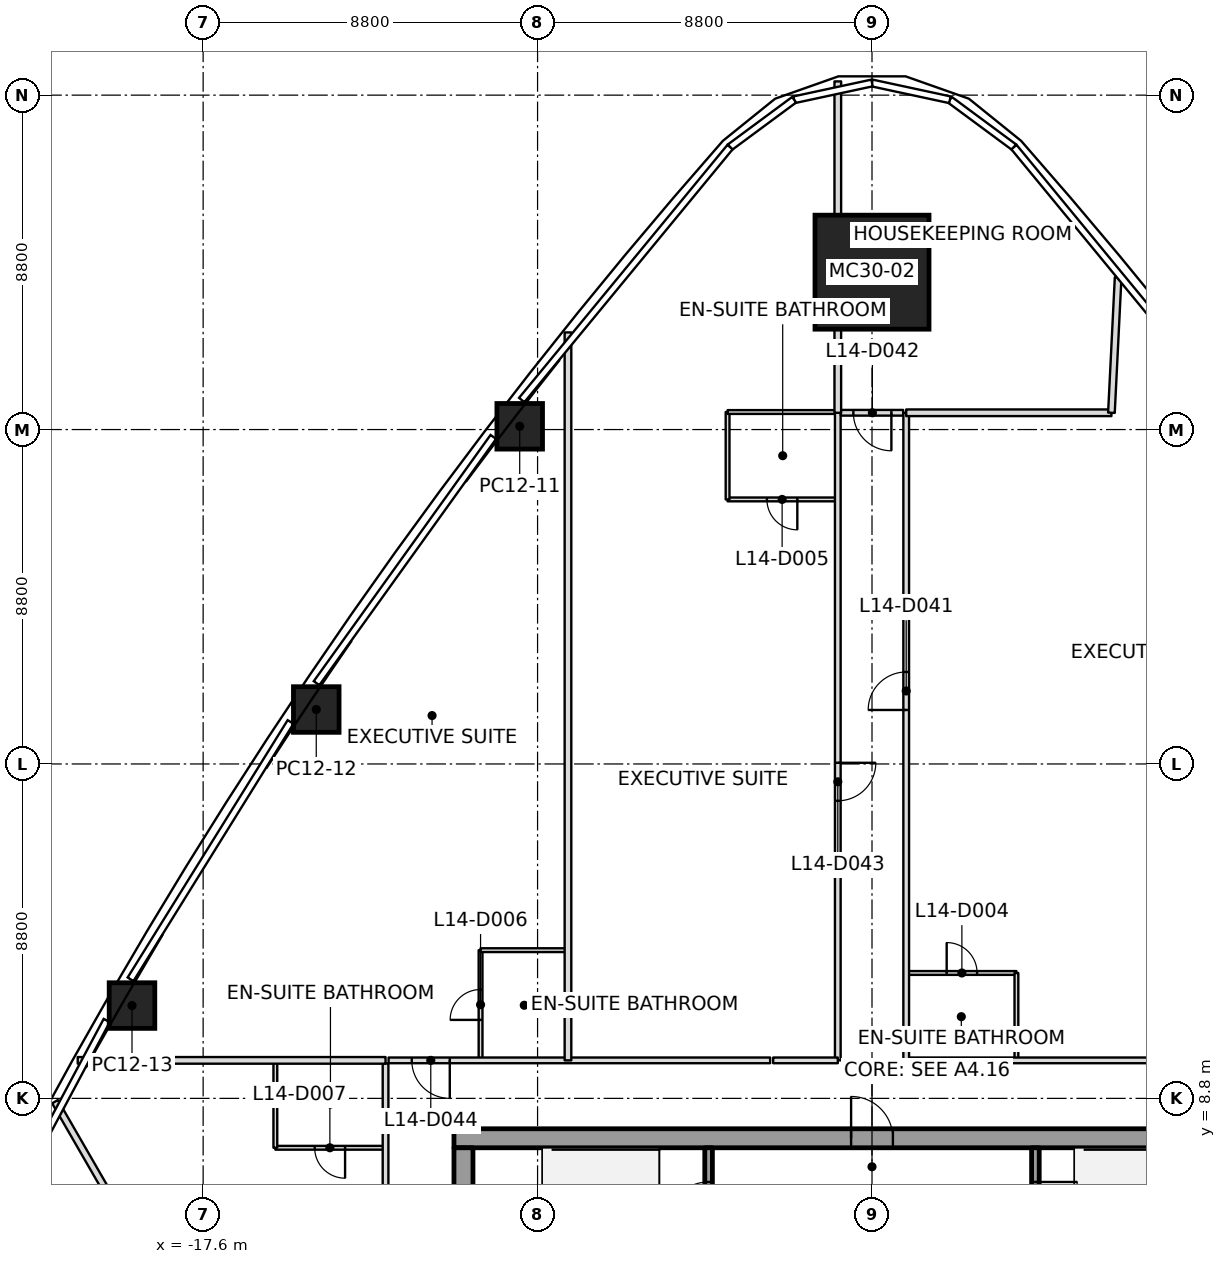
"""IFC4 building model, lengths in metres.
Left out: names, types, materials, properties, quantities, classifications, styles, units other than length and angle.
Written with IfcOpenShell. Run it as: python <this file> out.ifc"""

import sys

from ifc_helpers import new_model, si_unit, direction, frame, frame_2d, origin, origin_2d, place, context, subcontext, project, spatial, rectangle, extrude, element, fill, save


model = new_model("IFC4")
c1 = context("Model", 3, precision=1e-05, world=origin(), true_north=direction((0.0, 1.0)))
c2 = subcontext(c1, "Body", "Model", "MODEL_VIEW")
j1 = project(units=[si_unit("LENGTHUNIT", "METRE"), si_unit("PLANEANGLEUNIT", "RADIAN")], contexts=[c1])
p1 = place(None, origin())
s1 = spatial("IfcSite", under=j1, at=p1, CompositionType="ELEMENT")
p2 = place(p1, origin())
s2 = spatial("IfcBuilding", under=s1, at=p2, CompositionType="ELEMENT")
p3 = place(p2, frame((0.0, 0.0, 73.9)))
s3 = spatial("IfcBuildingStorey", under=s2, at=p3, CompositionType="ELEMENT", Elevation=73.9)
p4 = place(p3, frame((0.0, 30.542, 0.0), z_axis=(0.0, -0.035277579215, 0.999377552482), x_axis=(1.0, 0.0, 0.0)))
e1 = element("IfcColumn", 1, at=p4, inside=s3, PredefinedType="COLUMN", context=c2, shape_type="SweptSolid", body=[
    extrude(rectangle(XDim=3.0, YDim=3.0, at=origin_2d()), origin(), (0.0, 0.0, 1.0), 3.702),
])
p5 = place(p3, frame((-9.27, 26.486, 0.0), z_axis=(0.000197891909, -0.02236178572, 0.99974992442), x_axis=(0.609946008584, 0.792247508558, 0.017599766916)))
e2 = element("IfcColumn", 2, at=p5, inside=s3, PredefinedType="COLUMN", context=c2, shape_type="SweptSolid", body=[
    extrude(rectangle(XDim=1.2, YDim=1.2, at=origin_2d()), origin(), (0.0, 0.0, 1.0), 3.701),
])
p6 = place(p3, frame((-14.623, 19.033, 0.0), z_axis=(0.005673642186, -0.014382023216, 0.999880476453), x_axis=(0.556182234491, 0.831013798021, 0.008797132212)))
e3 = element("IfcColumn", 3, at=p6, inside=s3, PredefinedType="COLUMN", context=c2, shape_type="SweptSolid", body=[
    extrude(rectangle(XDim=1.2, YDim=1.2, at=origin_2d()), origin(), (0.0, 0.0, 1.0), 3.701),
])
p7 = place(p3, frame((-19.472, 11.242, 0.0), z_axis=(0.010688020009, -0.006201690622, 0.999923649716), x_axis=(0.499971440741, 0.866041891424, 2.7221193e-05)))
e4 = element("IfcColumn", 4, at=p7, inside=s3, PredefinedType="COLUMN", context=c2, shape_type="SweptSolid", body=[
    extrude(rectangle(XDim=1.2, YDim=1.2, at=origin_2d()), origin(), (0.0, 0.0, 1.0), 3.7),
])
p8 = place(p3, frame((-11.0, 7.75, 0.0), z_axis=(0.0, 0.0, 1.0), x_axis=(1.0, 0.0, 0.0)))
e5 = element("IfcWall", 5, at=p8, inside=s3, PredefinedType="SHEAR", context=c2, shape_type="SweptSolid", body=[
    extrude(rectangle(XDim=22.0, YDim=0.5, at=frame_2d((11.0, 0.0))), origin(), (0.0, 0.0, 1.0), 3.7),
])
p9 = place(p8, frame((10.45, 0.0, 0.0)))
e6 = element("IfcOpeningElement", 6, at=p9, cuts=e5, PredefinedType="OPENING", context=c2, shape_type="SweptSolid", body=[
    extrude(rectangle(XDim=1.1, YDim=2.1, at=frame_2d((0.55, 1.05))), frame((0.0, 0.25, 0.0), z_axis=(0.0, -1.0, 0.0), x_axis=(1.0, 0.0, 0.0)), (0.0, 0.0, 1.0), 0.5),
])
p10 = place(p3, frame((-10.75, -7.5, 0.0), z_axis=(0.0, 0.0, 1.0), x_axis=(0.0, 1.0, 0.0)))
e7 = element("IfcWall", 7, at=p10, inside=s3, PredefinedType="SHEAR", context=c2, shape_type="SweptSolid", body=[
    extrude(rectangle(XDim=15.0, YDim=0.5, at=frame_2d((7.5, 0.0))), origin(), (0.0, 0.0, 1.0), 3.7),
])
p11 = place(p10, frame((6.6, 0.0, 0.0)))
e8 = element("IfcOpeningElement", 8, at=p11, cuts=e7, PredefinedType="OPENING", context=c2, shape_type="SweptSolid", body=[
    extrude(rectangle(XDim=1.8, YDim=2.1, at=frame_2d((0.9, 1.05))), frame((0.0, 0.25, 0.0), z_axis=(0.0, -1.0, 0.0), x_axis=(1.0, 0.0, 0.0)), (0.0, 0.0, 1.0), 0.5),
])
p12 = place(p3, frame((-4.3, 4.6, 0.0), z_axis=(0.0, 0.0, 1.0), x_axis=(0.0, 1.0, 0.0)))
e9 = element("IfcWall", 9, at=p12, inside=s3, PredefinedType="SOLIDWALL", context=c2, shape_type="SweptSolid", body=[
    extrude(rectangle(XDim=2.9, YDim=0.2, at=frame_2d((1.45, 0.0))), origin(), (0.0, 0.0, 1.0), 3.55),
])
p13 = place(p12, frame((0.9, 0.0, 0.0)))
e10 = element("IfcOpeningElement", 10, at=p13, cuts=e9, PredefinedType="OPENING", context=c2, shape_type="SweptSolid", body=[
    extrude(rectangle(XDim=1.1, YDim=2.1, at=frame_2d((0.55, 1.05))), frame((0.0, 0.1, 0.0), z_axis=(0.0, -1.0, 0.0), x_axis=(1.0, 0.0, 0.0)), (0.0, 0.0, 1.0), 0.2),
])
p14 = place(p3, frame((4.3, 7.5, 0.0), z_axis=(0.0, 0.0, 1.0), x_axis=(0.0, -1.0, 0.0)))
e11 = element("IfcWall", 11, at=p14, inside=s3, PredefinedType="SOLIDWALL", context=c2, shape_type="SweptSolid", body=[
    extrude(rectangle(XDim=2.9, YDim=0.2, at=frame_2d((1.45, 0.0))), origin(), (0.0, 0.0, 1.0), 3.55),
])
p15 = place(p14, frame((0.9, 0.0, 0.0)))
e12 = element("IfcOpeningElement", 12, at=p15, cuts=e11, PredefinedType="OPENING", context=c2, shape_type="SweptSolid", body=[
    extrude(rectangle(XDim=1.1, YDim=2.1, at=frame_2d((0.55, 1.05))), frame((0.0, 0.1, 0.0), z_axis=(0.0, -1.0, 0.0), x_axis=(1.0, 0.0, 0.0)), (0.0, 0.0, 1.0), 0.2),
])
p16 = place(p3, frame((-18.689, 3.849, 0.0), z_axis=(0.0, 0.0, 1.0), x_axis=(-0.49999586752, 0.86602778966, 0.0)))
e13 = element("IfcWall", 13, at=p16, inside=s3, PredefinedType="PARTITIONING", context=c2, shape_type="SweptSolid", body=[
    extrude(rectangle(XDim=5.617, YDim=0.175, at=frame_2d((2.808, 0.0))), origin(), (0.0, 0.0, 1.0), 2.934),
])
p17 = place(p3, frame((-12.8, 9.8, 0.0), z_axis=(0.0, 0.0, 1.0), x_axis=(-1.0, 0.0, 0.0)))
e14 = element("IfcWall", 14, at=p17, inside=s3, PredefinedType="PARTITIONING", context=c2, shape_type="SweptSolid", body=[
    extrude(rectangle(XDim=8.1, YDim=0.175, at=frame_2d((4.05, 0.0))), origin(), (0.0, 0.0, 1.0), 2.934),
])
p18 = place(p3, frame((-8.0, 9.8, 0.0), z_axis=(0.0, 0.0, 1.0), x_axis=(0.0, 1.0, 0.0)))
e15 = element("IfcWall", 15, at=p18, inside=s3, PredefinedType="PARTITIONING", context=c2, shape_type="SweptSolid", body=[
    extrude(rectangle(XDim=19.156, YDim=0.175, at=frame_2d((9.578, 0.0))), origin(), (0.0, 0.0, 1.0), 2.934),
])
p19 = place(p3, frame((-0.9, 35.562, 0.0), z_axis=(0.0, 0.0, 1.0), x_axis=(0.0, -1.0, 0.0)))
e16 = element("IfcWall", 16, at=p19, inside=s3, PredefinedType="PARTITIONING", context=c2, shape_type="SweptSolid", body=[
    extrude(rectangle(XDim=8.72, YDim=0.175, at=frame_2d((4.36, 0.0))), origin(), (0.0, 0.0, 1.0), 2.934),
])
p20 = place(p3, frame((0.9, 26.842, 0.0), z_axis=(0.0, 0.0, 1.0), x_axis=(1.0, 0.0, 0.0)))
e17 = element("IfcWall", 17, at=p20, inside=s3, PredefinedType="PARTITIONING", context=c2, shape_type="SweptSolid", body=[
    extrude(rectangle(XDim=5.4, YDim=0.175, at=frame_2d((2.7, 0.0))), origin(), (0.0, 0.0, 1.0), 3.15),
])
p21 = place(p3, frame((6.3, 26.842, 0.0), z_axis=(0.0, 0.0, 1.0), x_axis=(0.049548494215, 0.998771719023, 0.0)))
e18 = element("IfcWall", 18, at=p21, inside=s3, PredefinedType="PARTITIONING", context=c2, shape_type="SweptSolid", body=[
    extrude(rectangle(XDim=3.567, YDim=0.175, at=frame_2d((1.784, 0.0))), origin(), (0.0, 0.0, 1.0), 2.934),
])
p22 = place(p3, frame((-12.8, 9.72, 0.0), z_axis=(0.0, 0.0, 1.0), x_axis=(0.0, -1.0, 0.0)))
e19 = element("IfcWall", 19, at=p22, inside=s3, PredefinedType="PARTITIONING", context=c2, shape_type="SweptSolid", body=[
    extrude(rectangle(XDim=16.071, YDim=0.15, at=frame_2d((8.035, 0.0))), origin(), (0.0, 0.0, 1.0), 2.947),
])
p23 = place(p22, frame((3.595, 0.0, 0.0)))
e20 = element("IfcOpeningElement", 20, at=p23, cuts=e19, PredefinedType="OPENING", context=c2, shape_type="SweptSolid", body=[
    extrude(rectangle(XDim=1.0, YDim=2.1, at=frame_2d((0.5, 1.05))), frame((0.0, 0.075, 0.0), z_axis=(0.0, -1.0, 0.0), x_axis=(1.0, 0.0, 0.0)), (0.0, 0.0, 1.0), 0.15),
])
p24 = place(p3, frame((-2.68, 9.8, 0.0), z_axis=(0.0, 0.0, 1.0), x_axis=(-1.0, 0.0, 0.0)))
e21 = element("IfcWall", 21, at=p24, inside=s3, PredefinedType="PARTITIONING", context=c2, shape_type="SweptSolid", body=[
    extrude(rectangle(XDim=10.04, YDim=0.15, at=frame_2d((5.02, 0.0))), origin(), (0.0, 0.0, 1.0), 2.947),
])
p25 = place(p24, frame((8.43, 0.0, 0.0)))
e22 = element("IfcOpeningElement", 22, at=p25, cuts=e21, PredefinedType="OPENING", context=c2, shape_type="SweptSolid", body=[
    extrude(rectangle(XDim=1.0, YDim=2.1, at=frame_2d((0.5, 1.05))), frame((0.0, 0.075, 0.0), z_axis=(0.0, -1.0, 0.0), x_axis=(1.0, 0.0, 0.0)), (0.0, 0.0, 1.0), 0.15),
])
p26 = place(p3, frame((-0.9, 26.842, 0.0), z_axis=(0.0, 0.0, 1.0), x_axis=(0.0, -1.0, 0.0)))
e23 = element("IfcWall", 23, at=p26, inside=s3, PredefinedType="PARTITIONING", context=c2, shape_type="SweptSolid", body=[
    extrude(rectangle(XDim=17.042, YDim=0.15, at=frame_2d((8.521, 0.0))), origin(), (0.0, 0.0, 1.0), 2.947),
])
p27 = place(p26, frame((9.211, 0.0, 0.0)))
e24 = element("IfcOpeningElement", 24, at=p27, cuts=e23, PredefinedType="OPENING", context=c2, shape_type="SweptSolid", body=[
    extrude(rectangle(XDim=1.0, YDim=2.1, at=frame_2d((0.5, 1.05))), frame((0.0, 0.075, 0.0), z_axis=(0.0, -1.0, 0.0), x_axis=(1.0, 0.0, 0.0)), (0.0, 0.0, 1.0), 0.15),
])
p28 = place(p3, frame((-0.9, 9.8, 0.0), z_axis=(0.0, 0.0, 1.0), x_axis=(-1.0, 0.0, 0.0)))
e25 = element("IfcWall", 25, at=p28, inside=s3, PredefinedType="PARTITIONING", context=c2, shape_type="SweptSolid", body=[
    extrude(rectangle(XDim=1.7, YDim=0.15, at=frame_2d((0.85, 0.0))), origin(), (0.0, 0.0, 1.0), 3.15),
])
p29 = place(p3, frame((0.82, 26.842, 0.0), z_axis=(0.0, 0.0, 1.0), x_axis=(-1.0, 0.0, 0.0)))
e26 = element("IfcWall", 26, at=p29, inside=s3, PredefinedType="PARTITIONING", context=c2, shape_type="SweptSolid", body=[
    extrude(rectangle(XDim=1.64, YDim=0.15, at=frame_2d((0.82, 0.0))), origin(), (0.0, 0.0, 1.0), 2.797),
])
p30 = place(p29, frame((0.31, 0.0, 0.0)))
e27 = element("IfcOpeningElement", 27, at=p30, cuts=e26, PredefinedType="OPENING", context=c2, shape_type="SweptSolid", body=[
    extrude(rectangle(XDim=1.0, YDim=2.1, at=frame_2d((0.5, 1.05))), frame((0.0, 0.075, 0.0), z_axis=(0.0, -1.0, 0.0), x_axis=(1.0, 0.0, 0.0)), (0.0, 0.0, 1.0), 0.15),
])
p31 = place(p3, frame((11.02, 9.8, 0.0), z_axis=(0.0, 0.0, 1.0), x_axis=(-1.0, 0.0, 0.0)))
e28 = element("IfcWall", 28, at=p31, inside=s3, PredefinedType="PARTITIONING", context=c2, shape_type="SweptSolid", body=[
    extrude(rectangle(XDim=10.12, YDim=0.15, at=frame_2d((5.06, 0.0))), origin(), (0.0, 0.0, 1.0), 2.947),
])
p32 = place(p3, frame((0.9, 9.8, 0.0), z_axis=(0.0, 0.0, 1.0), x_axis=(0.0, 1.0, 0.0)))
e29 = element("IfcWall", 29, at=p32, inside=s3, PredefinedType="PARTITIONING", context=c2, shape_type="SweptSolid", body=[
    extrude(rectangle(XDim=17.042, YDim=0.15, at=frame_2d((8.521, 0.0))), origin(), (0.0, 0.0, 1.0), 2.947),
])
p33 = place(p32, frame((9.221, 0.0, 0.0)))
e30 = element("IfcOpeningElement", 30, at=p33, cuts=e29, PredefinedType="OPENING", context=c2, shape_type="SweptSolid", body=[
    extrude(rectangle(XDim=1.0, YDim=2.1, at=frame_2d((0.5, 1.05))), frame((0.0, 0.075, 0.0), z_axis=(0.0, -1.0, 0.0), x_axis=(1.0, 0.0, 0.0)), (0.0, 0.0, 1.0), 0.15),
])
p34 = place(p3, frame((-12.83, 7.5, 0.0), z_axis=(0.0, 0.0, 1.0), x_axis=(-1.0, 0.0, 0.0)))
e31 = element("IfcWall", 31, at=p34, inside=s3, PredefinedType="PARTITIONING", context=c2, shape_type="SweptSolid", body=[
    extrude(rectangle(XDim=2.87, YDim=0.1, at=frame_2d((1.435, 0.0))), origin(), (0.0, 0.0, 1.0), 3.15),
])
p35 = place(p34, frame((1.035, 0.0, 0.0)))
e32 = element("IfcOpeningElement", 32, at=p35, cuts=e31, PredefinedType="OPENING", context=c2, shape_type="SweptSolid", body=[
    extrude(rectangle(XDim=0.8, YDim=2.1, at=frame_2d((0.4, 1.05))), frame((0.0, 0.05, 0.0), z_axis=(0.0, -1.0, 0.0), x_axis=(1.0, 0.0, 0.0)), (0.0, 0.0, 1.0), 0.1),
])
p36 = place(p3, frame((-15.7, 7.5, 0.0), z_axis=(0.0, 0.0, 1.0), x_axis=(0.0, 1.0, 0.0)))
e33 = element("IfcWall", 33, at=p36, inside=s3, PredefinedType="PARTITIONING", context=c2, shape_type="SweptSolid", body=[
    extrude(rectangle(XDim=2.27, YDim=0.1, at=frame_2d((1.135, 0.0))), origin(), (0.0, 0.0, 1.0), 3.15),
])
p37 = place(p3, frame((-10.3, 9.83, 0.0), z_axis=(0.0, 0.0, 1.0), x_axis=(0.0, 1.0, 0.0)))
e34 = element("IfcWall", 34, at=p37, inside=s3, PredefinedType="PARTITIONING", context=c2, shape_type="SweptSolid", body=[
    extrude(rectangle(XDim=2.87, YDim=0.1, at=frame_2d((1.435, 0.0))), origin(), (0.0, 0.0, 1.0), 2.947),
])
p38 = place(p37, frame((1.035, 0.0, 0.0)))
e35 = element("IfcOpeningElement", 35, at=p38, cuts=e34, PredefinedType="OPENING", context=c2, shape_type="SweptSolid", body=[
    extrude(rectangle(XDim=0.8, YDim=2.1, at=frame_2d((0.4, 1.05))), frame((0.0, 0.05, 0.0), z_axis=(0.0, -1.0, 0.0), x_axis=(1.0, 0.0, 0.0)), (0.0, 0.0, 1.0), 0.1),
])
p39 = place(p3, frame((-10.3, 12.7, 0.0), z_axis=(0.0, 0.0, 1.0), x_axis=(1.0, 0.0, 0.0)))
e36 = element("IfcWall", 36, at=p39, inside=s3, PredefinedType="PARTITIONING", context=c2, shape_type="SweptSolid", body=[
    extrude(rectangle(XDim=2.27, YDim=0.1, at=frame_2d((1.135, 0.0))), origin(), (0.0, 0.0, 1.0), 3.15),
])
p40 = place(p3, frame((-0.93, 24.562, 0.0), z_axis=(0.0, 0.0, 1.0), x_axis=(-1.0, 0.0, 0.0)))
e37 = element("IfcWall", 37, at=p40, inside=s3, PredefinedType="PARTITIONING", context=c2, shape_type="SweptSolid", body=[
    extrude(rectangle(XDim=2.87, YDim=0.1, at=frame_2d((1.435, 0.0))), origin(), (0.0, 0.0, 1.0), 3.15),
])
p41 = place(p40, frame((1.035, 0.0, 0.0)))
e38 = element("IfcOpeningElement", 38, at=p41, cuts=e37, PredefinedType="OPENING", context=c2, shape_type="SweptSolid", body=[
    extrude(rectangle(XDim=0.8, YDim=2.1, at=frame_2d((0.4, 1.05))), frame((0.0, 0.05, 0.0), z_axis=(0.0, -1.0, 0.0), x_axis=(1.0, 0.0, 0.0)), (0.0, 0.0, 1.0), 0.1),
])
p42 = place(p3, frame((-3.8, 24.562, 0.0), z_axis=(0.0, 0.0, 1.0), x_axis=(0.0, 1.0, 0.0)))
e39 = element("IfcWall", 39, at=p42, inside=s3, PredefinedType="PARTITIONING", context=c2, shape_type="SweptSolid", body=[
    extrude(rectangle(XDim=2.3, YDim=0.1, at=frame_2d((1.15, 0.0))), origin(), (0.0, 0.0, 1.0), 3.15),
])
p43 = place(p3, frame((-3.8, 26.862, 0.0), z_axis=(0.0, 0.0, 1.0), x_axis=(1.0, 0.0, 0.0)))
e40 = element("IfcWall", 40, at=p43, inside=s3, PredefinedType="PARTITIONING", context=c2, shape_type="SweptSolid", body=[
    extrude(rectangle(XDim=2.87, YDim=0.1, at=frame_2d((1.435, 0.0))), origin(), (0.0, 0.0, 1.0), 3.15),
])
p44 = place(p3, frame((0.93, 12.1, 0.0), z_axis=(0.0, 0.0, 1.0), x_axis=(1.0, 0.0, 0.0)))
e41 = element("IfcWall", 41, at=p44, inside=s3, PredefinedType="PARTITIONING", context=c2, shape_type="SweptSolid", body=[
    extrude(rectangle(XDim=2.87, YDim=0.1, at=frame_2d((1.435, 0.0))), origin(), (0.0, 0.0, 1.0), 3.15),
])
p45 = place(p44, frame((1.035, 0.0, 0.0)))
e42 = element("IfcOpeningElement", 42, at=p45, cuts=e41, PredefinedType="OPENING", context=c2, shape_type="SweptSolid", body=[
    extrude(rectangle(XDim=0.8, YDim=2.1, at=frame_2d((0.4, 1.05))), frame((0.0, 0.05, 0.0), z_axis=(0.0, -1.0, 0.0), x_axis=(1.0, 0.0, 0.0)), (0.0, 0.0, 1.0), 0.1),
])
p46 = place(p3, frame((3.8, 12.1, 0.0), z_axis=(0.0, 0.0, 1.0), x_axis=(0.0, -1.0, 0.0)))
e43 = element("IfcWall", 43, at=p46, inside=s3, PredefinedType="PARTITIONING", context=c2, shape_type="SweptSolid", body=[
    extrude(rectangle(XDim=2.27, YDim=0.1, at=frame_2d((1.135, 0.0))), origin(), (0.0, 0.0, 1.0), 3.15),
])
p47 = place(p33, origin())
e44 = element("IfcDoor", 44, at=p47, inside=s3, OperationType="SINGLE_SWING_LEFT", PredefinedType="DOOR", context=c2, shape_type="SweptSolid", body=[
    extrude(rectangle(XDim=1.0, YDim=2.1, at=frame_2d((0.5, 1.05))), frame((0.0, 0.025, 0.0), z_axis=(0.0, -1.0, 0.0), x_axis=(1.0, 0.0, 0.0)), (0.0, 0.0, 1.0), 0.05),
])
fill(e30, e44)
p48 = place(p45, origin())
e45 = element("IfcDoor", 45, at=p48, inside=s3, OperationType="SINGLE_SWING_LEFT", PredefinedType="DOOR", context=c2, shape_type="SweptSolid", body=[
    extrude(rectangle(XDim=0.8, YDim=2.1, at=frame_2d((0.4, 1.05))), frame((0.0, 0.025, 0.0), z_axis=(0.0, -1.0, 0.0), x_axis=(1.0, 0.0, 0.0)), (0.0, 0.0, 1.0), 0.05),
])
fill(e42, e45)
p49 = place(p30, origin())
e46 = element("IfcDoor", 46, at=p49, inside=s3, OperationType="SINGLE_SWING_LEFT", PredefinedType="DOOR", context=c2, shape_type="SweptSolid", body=[
    extrude(rectangle(XDim=1.0, YDim=2.1, at=frame_2d((0.5, 1.05))), frame((0.0, 0.025, 0.0), z_axis=(0.0, -1.0, 0.0), x_axis=(1.0, 0.0, 0.0)), (0.0, 0.0, 1.0), 0.05),
])
fill(e27, e46)
p50 = place(p27, origin())
e47 = element("IfcDoor", 47, at=p50, inside=s3, OperationType="SINGLE_SWING_RIGHT", PredefinedType="DOOR", context=c2, shape_type="SweptSolid", body=[
    extrude(rectangle(XDim=1.0, YDim=2.1, at=frame_2d((0.5, 1.05))), frame((0.0, 0.025, 0.0), z_axis=(0.0, -1.0, 0.0), x_axis=(1.0, 0.0, 0.0)), (0.0, 0.0, 1.0), 0.05),
])
fill(e24, e47)
p51 = place(p41, origin())
e48 = element("IfcDoor", 48, at=p51, inside=s3, OperationType="SINGLE_SWING_LEFT", PredefinedType="DOOR", context=c2, shape_type="SweptSolid", body=[
    extrude(rectangle(XDim=0.8, YDim=2.1, at=frame_2d((0.4, 1.05))), frame((0.0, 0.025, 0.0), z_axis=(0.0, -1.0, 0.0), x_axis=(1.0, 0.0, 0.0)), (0.0, 0.0, 1.0), 0.05),
])
fill(e38, e48)
p52 = place(p25, origin())
e49 = element("IfcDoor", 49, at=p52, inside=s3, OperationType="SINGLE_SWING_LEFT", PredefinedType="DOOR", context=c2, shape_type="SweptSolid", body=[
    extrude(rectangle(XDim=1.0, YDim=2.1, at=frame_2d((0.5, 1.05))), frame((0.0, 0.025, 0.0), z_axis=(0.0, -1.0, 0.0), x_axis=(1.0, 0.0, 0.0)), (0.0, 0.0, 1.0), 0.05),
])
fill(e22, e49)
p53 = place(p38, origin())
e50 = element("IfcDoor", 50, at=p53, inside=s3, OperationType="SINGLE_SWING_LEFT", PredefinedType="DOOR", context=c2, shape_type="SweptSolid", body=[
    extrude(rectangle(XDim=0.8, YDim=2.1, at=frame_2d((0.4, 1.05))), frame((0.0, 0.025, 0.0), z_axis=(0.0, -1.0, 0.0), x_axis=(1.0, 0.0, 0.0)), (0.0, 0.0, 1.0), 0.05),
])
fill(e35, e50)
p54 = place(p35, origin())
e51 = element("IfcDoor", 51, at=p54, inside=s3, OperationType="SINGLE_SWING_RIGHT", PredefinedType="DOOR", context=c2, shape_type="SweptSolid", body=[
    extrude(rectangle(XDim=0.8, YDim=2.1, at=frame_2d((0.4, 1.05))), frame((0.0, 0.025, 0.0), z_axis=(0.0, -1.0, 0.0), x_axis=(1.0, 0.0, 0.0)), (0.0, 0.0, 1.0), 0.05),
])
fill(e32, e51)
p55 = place(p13, origin())
e52 = element("IfcDoor", 52, at=p55, inside=s3, OperationType="SINGLE_SWING_RIGHT", PredefinedType="DOOR", context=c2, shape_type="SweptSolid", body=[
    extrude(rectangle(XDim=1.1, YDim=2.1, at=frame_2d((0.55, 1.05))), frame((0.0, 0.025, 0.0), z_axis=(0.0, -1.0, 0.0), x_axis=(1.0, 0.0, 0.0)), (0.0, 0.0, 1.0), 0.05),
])
fill(e10, e52)
p56 = place(p15, origin())
e53 = element("IfcDoor", 53, at=p56, inside=s3, OperationType="SINGLE_SWING_LEFT", PredefinedType="DOOR", context=c2, shape_type="SweptSolid", body=[
    extrude(rectangle(XDim=1.1, YDim=2.1, at=frame_2d((0.55, 1.05))), frame((0.0, 0.025, 0.0), z_axis=(0.0, -1.0, 0.0), x_axis=(1.0, 0.0, 0.0)), (0.0, 0.0, 1.0), 0.05),
])
fill(e12, e53)
p57 = place(p9, origin())
e54 = element("IfcDoor", 54, at=p57, inside=s3, OperationType="SINGLE_SWING_RIGHT", PredefinedType="DOOR", context=c2, shape_type="SweptSolid", body=[
    extrude(rectangle(XDim=1.1, YDim=2.1, at=frame_2d((0.55, 1.05))), frame((0.0, 0.025, 0.0), z_axis=(0.0, -1.0, 0.0), x_axis=(1.0, 0.0, 0.0)), (0.0, 0.0, 1.0), 0.05),
])
fill(e6, e54)
save(model, sys.argv[1])
